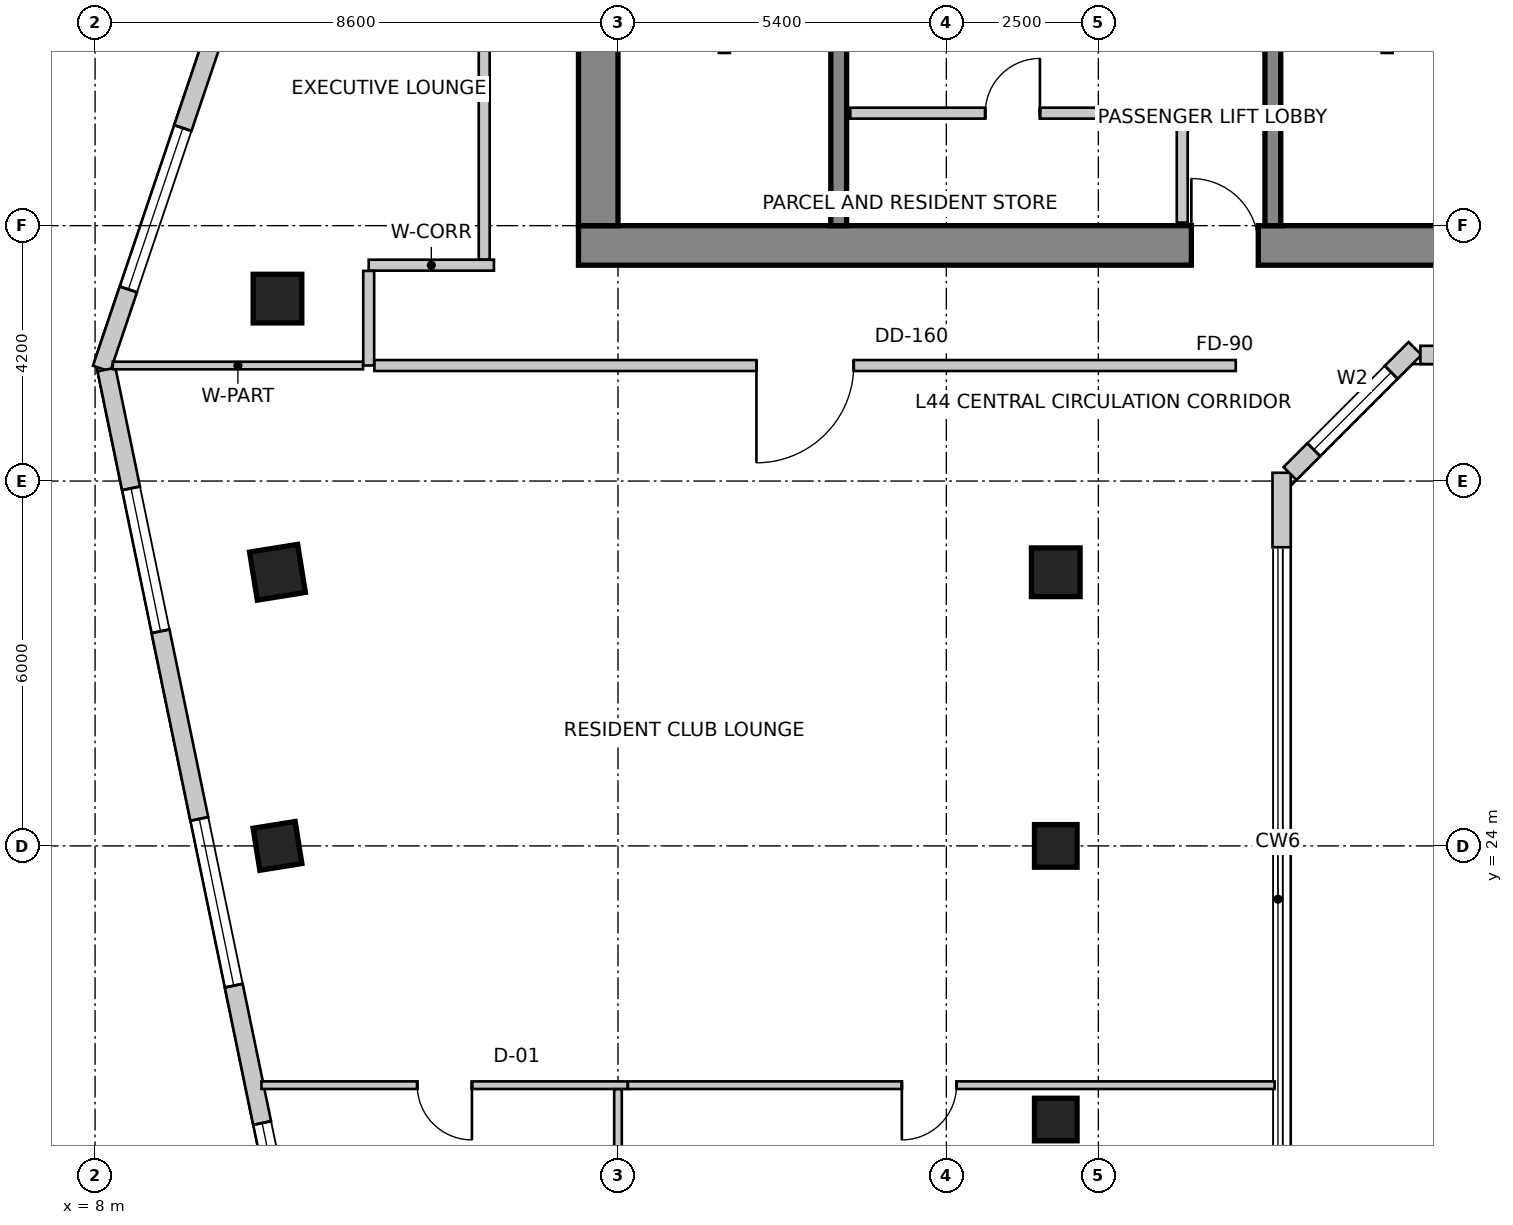
"""IFC4 building model, lengths in metres.
Left out: names, types, materials, properties, quantities, classifications, styles, units other than length and angle.
Written with IfcOpenShell. Run it as: python <this file> out.ifc"""

import sys

from ifc_helpers import new_model, si_unit, direction, frame, frame_2d, origin, origin_2d, place, context, subcontext, project, spatial, rectangle, extrude, source, transform, mapped, element, fill, save


model = new_model("IFC4")
c1 = context("Model", 3, precision=1e-05, world=origin(), true_north=direction((0.0, 1.0)))
c2 = subcontext(c1, "Body", "Model", "MODEL_VIEW")
j1 = project(units=[si_unit("LENGTHUNIT", "METRE"), si_unit("PLANEANGLEUNIT", "RADIAN")], contexts=[c1])
p1 = place(None, origin())
s1 = spatial("IfcSite", under=j1, at=p1, CompositionType="ELEMENT")
p2 = place(p1, origin())
s2 = spatial("IfcBuilding", under=s1, at=p2, CompositionType="ELEMENT")
p3 = place(p2, frame((0.0, 0.0, 178.2)))
s3 = spatial("IfcBuildingStorey", under=s2, at=p3, CompositionType="ELEMENT", Elevation=178.2)
p4 = place(p3, frame((15.95, 33.875, 0.0), z_axis=(0.0, 0.0, 1.0), x_axis=(1.0, 0.0, 0.0)))
e1 = element("IfcWall", 1, at=p4, inside=s3, PredefinedType="SHEAR", context=c2, shape_type="SweptSolid", body=[
    extrude(rectangle(XDim=15.7, YDim=0.65, at=frame_2d((7.85, 0.0))), origin(), (0.0, 0.0, 1.0), 5.2),
])
m1 = source(origin(), c2, "Body", "SweptSolid", [
    extrude(rectangle(XDim=1.1, YDim=2.15, at=frame_2d((0.55, 1.075))), frame((0.0, 0.335, 0.0), z_axis=(0.0, -1.0, 0.0), x_axis=(1.0, 0.0, 0.0)), (0.0, 0.0, 1.0), 0.67),
])
p5 = place(p4, frame((10.08, 0.0, 0.0)))
e2 = element("IfcOpeningElement", 2, at=p5, cuts=e1, PredefinedType="OPENING", context=c2, shape_type="MappedRepresentation", body=[
    mapped(m1, transform((0.0, 0.0, 0.0), scale=1.0)),
])
p6 = place(p3, frame((16.275, 34.2, 0.0), z_axis=(0.0, 0.0, 1.0), x_axis=(0.0, 1.0, 0.0)))
e3 = element("IfcWall", 3, at=p6, inside=s3, PredefinedType="SHEAR", context=c2, shape_type="SweptSolid", body=[
    extrude(rectangle(XDim=11.4, YDim=0.65, at=frame_2d((5.7, 0.0))), origin(), (0.0, 0.0, 1.0), 5.2),
])
p7 = place(p6, frame((7.15, 0.0, 0.0)))
e4 = element("IfcOpeningElement", 4, at=p7, cuts=e3, PredefinedType="OPENING", context=c2, shape_type="MappedRepresentation", body=[
    mapped(m1, transform((0.0, 0.0, 0.0), scale=1.0)),
])
p8 = place(p3, frame((20.23, 34.2, 0.0), z_axis=(0.0, 0.0, 1.0), x_axis=(0.0, 1.0, 0.0)))
e5 = element("IfcWall", 5, at=p8, inside=s3, PredefinedType="SHEAR", context=c2, shape_type="SweptSolid", body=[
    extrude(rectangle(XDim=9.06, YDim=0.26, at=frame_2d((4.53, 0.0))), origin(), (0.0, 0.0, 1.0), 5.2),
])
m2 = source(origin(), c2, "Body", "SweptSolid", [
    extrude(rectangle(XDim=1.1, YDim=2.15, at=frame_2d((0.55, 1.075))), frame((0.0, 0.14, 0.0), z_axis=(0.0, -1.0, 0.0), x_axis=(1.0, 0.0, 0.0)), (0.0, 0.0, 1.0), 0.28),
])
p9 = place(p8, frame((7.45, 0.0, 0.0)))
e6 = element("IfcOpeningElement", 6, at=p9, cuts=e5, PredefinedType="OPENING", context=c2, shape_type="MappedRepresentation", body=[
    mapped(m2, transform((0.0, 0.0, 0.0), scale=1.0)),
])
p10 = place(p3, frame((27.37, 34.2, 0.0), z_axis=(0.0, 0.0, 1.0), x_axis=(0.0, 1.0, 0.0)))
e7 = element("IfcWall", 7, at=p10, inside=s3, PredefinedType="SHEAR", context=c2, shape_type="SweptSolid", body=[
    extrude(rectangle(XDim=9.06, YDim=0.26, at=frame_2d((4.53, 0.0))), origin(), (0.0, 0.0, 1.0), 5.2),
])
p11 = place(p10, frame((7.45, 0.0, 0.0)))
e8 = element("IfcOpeningElement", 8, at=p11, cuts=e7, PredefinedType="OPENING", context=c2, shape_type="MappedRepresentation", body=[
    mapped(m2, transform((0.0, 0.0, 0.0), scale=1.0)),
])
m3 = source(origin(), c2, "Body", "SweptSolid", [
    extrude(rectangle(XDim=0.8, YDim=0.8, at=origin_2d()), origin(), (0.0, 0.0, 1.0), 5.2),
])
for number, where, z_axis, x_axis in (
    (9, (11.0, 33.0, 0.0), (0.0, 0.0, 1.0), (1.0, 0.0, 0.0)),
    (10, (11.0, 28.5, 0.0), (0.0, 0.0, 1.0), (0.158, -0.987, 0.0)),
):
    element("IfcColumn", number, at=place(p3, frame(where, z_axis=z_axis, x_axis=x_axis)), inside=s3, PredefinedType="COLUMN", context=c2, shape_type="MappedRepresentation", body=[
        mapped(m3, transform((0.0, 0.0, 0.0), scale=1.0)),
    ])
m4 = source(origin(), c2, "Body", "SweptSolid", [
    extrude(rectangle(XDim=0.7, YDim=0.7, at=origin_2d()), origin(), (0.0, 0.0, 1.0), 5.2),
])
p12 = place(p3, frame((11.0, 24.0, 0.0), z_axis=(0.0, 0.0, 1.0), x_axis=(0.158158067254, -0.987413806751, 0.0)))
e11 = element("IfcColumn", 11, at=p12, inside=s3, PredefinedType="COLUMN", context=c2, shape_type="MappedRepresentation", body=[
    mapped(m4, transform((0.0, 0.0, 0.0), scale=1.0)),
])
p13 = place(p3, frame((23.8, 28.5, 0.0), z_axis=(0.0, 0.0, 1.0), x_axis=(1.0, 0.0, 0.0)))
e12 = element("IfcColumn", 12, at=p13, inside=s3, PredefinedType="COLUMN", context=c2, shape_type="MappedRepresentation", body=[
    mapped(m3, transform((0.0, 0.0, 0.0), scale=1.0)),
])
for number, where, z_axis, x_axis in (
    (13, (23.8, 24.0, 0.0), (0.0, 0.0, 1.0), (1.0, 0.0, 0.0)),
    (14, (23.8, 19.5, 0.0), (0.0, 0.0, 1.0), (1.0, 0.0, 0.0)),
):
    element("IfcColumn", number, at=place(p3, frame(where, z_axis=z_axis, x_axis=x_axis)), inside=s3, PredefinedType="COLUMN", context=c2, shape_type="MappedRepresentation", body=[
        mapped(m4, transform((0.0, 0.0, 0.0), scale=1.0)),
    ])
p14 = place(p3, frame((27.514, 28.911, 0.0), z_axis=(0.0, 0.0, 1.0), x_axis=(0.0, 1.0, 0.0)))
e15 = element("IfcWall", 15, at=p14, inside=s3, PredefinedType="SOLIDWALL", context=c2, shape_type="SweptSolid", body=[
    extrude(rectangle(XDim=1.225, YDim=0.3, at=frame_2d((0.612, 0.0))), origin(), (0.0, 0.0, 1.0), 4.95),
])
p15 = place(p3, frame((27.652, 30.124, 0.0), z_axis=(0.0, 0.0, 1.0), x_axis=(0.707064797706, 0.707148762175, 0.0)))
e16 = element("IfcWall", 16, at=p15, inside=s3, PredefinedType="SOLIDWALL", context=c2, shape_type="SweptSolid", body=[
    extrude(rectangle(XDim=2.908, YDim=0.3, at=frame_2d((1.454, 0.0))), origin(), (0.0, 0.0, 1.0), 4.95),
])
m5 = source(origin(), c2, "Body", "SweptSolid", [
    extrude(rectangle(XDim=1.8, YDim=2.1, at=frame_2d((0.9, 1.05))), frame((0.0, 0.16, 0.0), z_axis=(0.0, -1.0, 0.0), x_axis=(1.0, 0.0, 0.0)), (0.0, 0.0, 1.0), 0.32),
])
p16 = place(p15, frame((0.554, 0.0, 0.85)))
e17 = element("IfcOpeningElement", 17, at=p16, cuts=e16, PredefinedType="OPENING", context=c2, shape_type="MappedRepresentation", body=[
    mapped(m5, transform((0.0, 0.0, 0.0), scale=1.0)),
])
p17 = place(p3, frame((29.797, 32.074, 0.0), z_axis=(0.0, 0.0, 1.0), x_axis=(1.0, 0.0, 0.0)))
e18 = element("IfcWall", 18, at=p17, inside=s3, PredefinedType="SOLIDWALL", context=c2, shape_type="SweptSolid", body=[
    extrude(rectangle(XDim=0.88, YDim=0.3, at=frame_2d((0.44, 0.0))), origin(), (0.0, 0.0, 1.0), 4.95),
])
p18 = place(p3, frame((13.269, 47.134, 0.0), z_axis=(0.0, 0.0, 1.0), x_axis=(-0.319920776449, -0.947444297464, 0.0)))
e19 = element("IfcWall", 19, at=p18, inside=s3, PredefinedType="SOLIDWALL", context=c2, shape_type="SweptSolid", body=[
    extrude(rectangle(XDim=16.133, YDim=0.3, at=frame_2d((8.067, 0.0))), origin(), (0.0, 0.0, 1.0), 4.95),
])
m6 = source(origin(), c2, "Body", "SweptSolid", [
    extrude(rectangle(XDim=2.8, YDim=2.4, at=frame_2d((1.4, 1.2))), frame((0.0, 0.16, 0.0), z_axis=(0.0, -1.0, 0.0), x_axis=(1.0, 0.0, 0.0)), (0.0, 0.0, 1.0), 0.32),
])
p19 = place(p18, frame((2.163, 0.0, 0.85)))
e20 = element("IfcOpeningElement", 20, at=p19, cuts=e19, PredefinedType="OPENING", context=c2, shape_type="MappedRepresentation", body=[
    mapped(m6, transform((0.0, 0.0, 0.0), scale=1.0)),
])
m7 = source(origin(), c2, "Body", "SweptSolid", [
    extrude(rectangle(XDim=2.4, YDim=2.2, at=frame_2d((1.2, 1.1))), frame((0.0, 0.16, 0.0), z_axis=(0.0, -1.0, 0.0), x_axis=(1.0, 0.0, 0.0)), (0.0, 0.0, 1.0), 0.32),
])
p20 = place(p18, frame((7.26, 0.0, 0.85)))
e21 = element("IfcOpeningElement", 21, at=p20, cuts=e19, PredefinedType="OPENING", context=c2, shape_type="MappedRepresentation", body=[
    mapped(m7, transform((0.0, 0.0, 0.0), scale=1.0)),
])
p21 = place(p18, frame((11.957, 0.0, 0.85)))
e22 = element("IfcOpeningElement", 22, at=p21, cuts=e19, PredefinedType="OPENING", context=c2, shape_type="MappedRepresentation", body=[
    mapped(m6, transform((0.0, 0.0, 0.0), scale=1.0)),
])
p22 = place(p3, frame((8.188, 31.834, 0.0), z_axis=(0.0, 0.0, 1.0), x_axis=(0.202303475707, -0.979322880217, 0.0)))
e23 = element("IfcWall", 23, at=p22, inside=s3, PredefinedType="SOLIDWALL", context=c2, shape_type="SweptSolid", body=[
    extrude(rectangle(XDim=15.766, YDim=0.3, at=frame_2d((7.883, 0.0))), origin(), (0.0, 0.0, 1.0), 4.95),
])
p23 = place(p22, frame((1.995, 0.0, 0.85)))
e24 = element("IfcOpeningElement", 24, at=p23, cuts=e23, PredefinedType="OPENING", context=c2, shape_type="MappedRepresentation", body=[
    mapped(m7, transform((0.0, 0.0, 0.0), scale=1.0)),
])
p24 = place(p22, frame((7.546, 0.0, 0.85)))
e25 = element("IfcOpeningElement", 25, at=p24, cuts=e23, PredefinedType="OPENING", context=c2, shape_type="MappedRepresentation", body=[
    mapped(m6, transform((0.0, 0.0, 0.0), scale=1.0)),
])
p25 = place(p22, frame((12.653, 0.0, 0.85)))
e26 = element("IfcOpeningElement", 26, at=p25, cuts=e23, PredefinedType="OPENING", context=c2, shape_type="MappedRepresentation", body=[
    mapped(m7, transform((0.0, 0.0, 0.0), scale=1.0)),
])
p26 = place(p3, frame((20.42, 36.05, 0.0), z_axis=(0.0, 0.0, 1.0), x_axis=(1.0, 0.0, 0.0)))
e27 = element("IfcWall", 27, at=p26, inside=s3, PredefinedType="PARTITIONING", context=c2, shape_type="SweptSolid", body=[
    extrude(rectangle(XDim=5.46, YDim=0.18, at=frame_2d((2.73, 0.0))), origin(), (0.0, 0.0, 1.0), 4.95),
])
m8 = source(origin(), c2, "Body", "SweptSolid", [
    extrude(rectangle(XDim=0.9, YDim=2.15, at=frame_2d((0.45, 1.075))), frame((0.0, 0.1, 0.0), z_axis=(0.0, -1.0, 0.0), x_axis=(1.0, 0.0, 0.0)), (0.0, 0.0, 1.0), 0.2),
])
p27 = place(p26, frame((2.219, 0.0, 0.0)))
e28 = element("IfcOpeningElement", 28, at=p27, cuts=e27, PredefinedType="OPENING", context=c2, shape_type="MappedRepresentation", body=[
    mapped(m8, transform((0.0, 0.0, 0.0), scale=1.0)),
])
p28 = place(p3, frame((25.88, 35.956, 0.0), z_axis=(0.0, 0.0, 1.0), x_axis=(0.0, -1.0, 0.0)))
e29 = element("IfcWall", 29, at=p28, inside=s3, PredefinedType="PARTITIONING", context=c2, shape_type="SweptSolid", body=[
    extrude(rectangle(XDim=1.706, YDim=0.18, at=frame_2d((0.853, 0.0))), origin(), (0.0, 0.0, 1.0), 4.242),
])
p29 = place(p3, frame((12.5, 33.55, 0.0), z_axis=(0.0, 0.0, 1.0), x_axis=(1.0, 0.0, 0.0)))
e30 = element("IfcWall", 30, at=p29, inside=s3, PredefinedType="PARTITIONING", context=c2, shape_type="SweptSolid", body=[
    extrude(rectangle(XDim=2.06, YDim=0.18, at=frame_2d((1.03, 0.0))), origin(), (0.0, 0.0, 1.0), 4.95),
])
p30 = place(p3, frame((12.5, 31.9, 0.0), z_axis=(0.0, 0.0, 1.0), x_axis=(0.0, 1.0, 0.0)))
e31 = element("IfcWall", 31, at=p30, inside=s3, PredefinedType="PARTITIONING", context=c2, shape_type="SweptSolid", body=[
    extrude(rectangle(XDim=1.556, YDim=0.18, at=frame_2d((0.778, 0.0))), origin(), (0.0, 0.0, 1.0), 4.634),
])
p31 = place(p3, frame((26.76, 31.9, 0.0), z_axis=(0.0, 0.0, 1.0), x_axis=(-1.0, 0.0, 0.0)))
e32 = element("IfcWall", 32, at=p31, inside=s3, PredefinedType="PARTITIONING", context=c2, shape_type="SweptSolid", body=[
    extrude(rectangle(XDim=14.166, YDim=0.18, at=frame_2d((7.083, 0.0))), origin(), (0.0, 0.0, 1.0), 4.634),
])
m9 = source(origin(), c2, "Body", "SweptSolid", [
    extrude(rectangle(XDim=1.6, YDim=2.15, at=frame_2d((0.8, 1.075))), frame((0.0, 0.1, 0.0), z_axis=(0.0, -1.0, 0.0), x_axis=(1.0, 0.0, 0.0)), (0.0, 0.0, 1.0), 0.2),
])
p32 = place(p31, frame((6.283, 0.0, 0.0)))
e33 = element("IfcOpeningElement", 33, at=p32, cuts=e32, PredefinedType="OPENING", context=c2, shape_type="MappedRepresentation", body=[
    mapped(m9, transform((0.0, 0.0, 0.0), scale=1.0)),
])
p33 = place(p3, frame((14.4, 33.644, 0.0), z_axis=(0.0, 0.0, 1.0), x_axis=(0.0, 1.0, 0.0)))
e34 = element("IfcWall", 34, at=p33, inside=s3, PredefinedType="PARTITIONING", context=c2, shape_type="SweptSolid", body=[
    extrude(rectangle(XDim=12.606, YDim=0.18, at=frame_2d((6.303, 0.0))), origin(), (0.0, 0.0, 1.0), 4.95),
])
p34 = place(p33, frame((4.399, 0.0, 0.0)))
e35 = element("IfcOpeningElement", 35, at=p34, cuts=e34, PredefinedType="OPENING", context=c2, shape_type="MappedRepresentation", body=[
    mapped(m8, transform((0.0, 0.0, 0.0), scale=1.0)),
])
p35 = place(p3, frame((12.406, 31.9, 0.0), z_axis=(0.0, 0.0, 1.0), x_axis=(-1.0, 0.0, 0.0)))
e36 = element("IfcWall", 36, at=p35, inside=s3, PredefinedType="PARTITIONING", context=c2, shape_type="SweptSolid", body=[
    extrude(rectangle(XDim=4.115, YDim=0.125, at=frame_2d((2.057, 0.0))), origin(), (0.0, 0.0, 1.0), 4.242),
])
p36 = place(p3, frame((16.76, 20.065, 0.0), z_axis=(0.0, 0.0, 1.0), x_axis=(-1.0, 0.0, 0.0)))
e37 = element("IfcWall", 37, at=p36, inside=s3, PredefinedType="PARTITIONING", context=c2, shape_type="SweptSolid", body=[
    extrude(rectangle(XDim=6.024, YDim=0.125, at=frame_2d((3.012, 0.0))), origin(), (0.0, 0.0, 1.0), 4.95),
])
m10 = source(origin(), c2, "Body", "SweptSolid", [
    extrude(rectangle(XDim=0.9, YDim=2.15, at=frame_2d((0.45, 1.075))), frame((0.0, 0.073, 0.0), z_axis=(0.0, -1.0, 0.0), x_axis=(1.0, 0.0, 0.0)), (0.0, 0.0, 1.0), 0.145),
])
p37 = place(p36, frame((2.562, 0.0, 0.0)))
e38 = element("IfcOpeningElement", 38, at=p37, cuts=e37, PredefinedType="OPENING", context=c2, shape_type="MappedRepresentation", body=[
    mapped(m10, transform((0.0, 0.0, 0.0), scale=1.0)),
])
p38 = place(p3, frame((27.399, 20.065, 0.0), z_axis=(0.0, 0.0, 1.0), x_axis=(-1.0, 0.0, 0.0)))
e39 = element("IfcWall", 39, at=p38, inside=s3, PredefinedType="PARTITIONING", context=c2, shape_type="SweptSolid", body=[
    extrude(rectangle(XDim=10.637, YDim=0.125, at=frame_2d((5.318, 0.0))), origin(), (0.0, 0.0, 1.0), 4.242),
])
p39 = place(p38, frame((5.231, 0.0, 0.0)))
e40 = element("IfcOpeningElement", 40, at=p39, cuts=e39, PredefinedType="OPENING", context=c2, shape_type="MappedRepresentation", body=[
    mapped(m10, transform((0.0, 0.0, 0.0), scale=1.0)),
])
p40 = place(p3, frame((16.6, 19.999, 0.0), z_axis=(0.0, 0.0, 1.0), x_axis=(0.0, -1.0, 0.0)))
e41 = element("IfcWall", 41, at=p40, inside=s3, PredefinedType="PARTITIONING", context=c2, shape_type="SweptSolid", body=[
    extrude(rectangle(XDim=7.134, YDim=0.125, at=frame_2d((3.567, 0.0))), origin(), (0.0, 0.0, 1.0), 4.242),
])
m11 = source(origin(), c2, "Body", "SweptSolid", [
    extrude(rectangle(XDim=1.8, YDim=2.1, at=frame_2d((0.9, 1.05))), frame((0.0, -0.015, 0.0), z_axis=(0.0, -1.0, 0.0), x_axis=(1.0, 0.0, 0.0)), (0.0, 0.0, 1.0), 0.06),
])
p41 = place(p16, origin())
e42 = element("IfcWindow", 42, at=p41, inside=s3, PartitioningType="SINGLE_PANEL", PredefinedType="WINDOW", context=c2, shape_type="MappedRepresentation", body=[
    mapped(m11, transform((0.0, 0.0, 0.0), scale=1.0)),
])
fill(e17, e42)
m12 = source(origin(), c2, "Body", "SweptSolid", [
    extrude(rectangle(XDim=2.8, YDim=2.4, at=frame_2d((1.4, 1.2))), frame((0.0, -0.015, 0.0), z_axis=(0.0, -1.0, 0.0), x_axis=(1.0, 0.0, 0.0)), (0.0, 0.0, 1.0), 0.06),
])
p42 = place(p21, origin())
e43 = element("IfcWindow", 43, at=p42, inside=s3, PartitioningType="SINGLE_PANEL", PredefinedType="WINDOW", context=c2, shape_type="MappedRepresentation", body=[
    mapped(m12, transform((0.0, 0.0, 0.0), scale=1.0)),
])
fill(e22, e43)
m13 = source(origin(), c2, "Body", "SweptSolid", [
    extrude(rectangle(XDim=2.4, YDim=2.2, at=frame_2d((1.2, 1.1))), frame((0.0, -0.015, 0.0), z_axis=(0.0, -1.0, 0.0), x_axis=(1.0, 0.0, 0.0)), (0.0, 0.0, 1.0), 0.06),
])
p43 = place(p23, origin())
e44 = element("IfcWindow", 44, at=p43, inside=s3, PartitioningType="SINGLE_PANEL", PredefinedType="WINDOW", context=c2, shape_type="MappedRepresentation", body=[
    mapped(m13, transform((0.0, 0.0, 0.0), scale=1.0)),
])
fill(e24, e44)
p44 = place(p24, origin())
e45 = element("IfcWindow", 45, at=p44, inside=s3, PartitioningType="SINGLE_PANEL", PredefinedType="WINDOW", context=c2, shape_type="MappedRepresentation", body=[
    mapped(m12, transform((0.0, 0.0, 0.0), scale=1.0)),
])
fill(e25, e45)
p45 = place(p25, origin())
e46 = element("IfcWindow", 46, at=p45, inside=s3, PartitioningType="SINGLE_PANEL", PredefinedType="WINDOW", context=c2, shape_type="MappedRepresentation", body=[
    mapped(m13, transform((0.0, 0.0, 0.0), scale=1.0)),
])
fill(e26, e46)
m14 = source(origin(), c2, "Body", "SweptSolid", [
    extrude(rectangle(XDim=1.1, YDim=2.15, at=frame_2d((0.55, 1.075))), frame((0.0, 0.025, 0.0), z_axis=(0.0, -1.0, 0.0), x_axis=(1.0, 0.0, 0.0)), (0.0, 0.0, 1.0), 0.05),
])
p46 = place(p5, origin())
e47 = element("IfcDoor", 47, at=p46, inside=s3, OperationType="SINGLE_SWING_LEFT", PredefinedType="DOOR", context=c2, shape_type="MappedRepresentation", body=[
    mapped(m14, transform((0.0, 0.0, 0.0), scale=1.0)),
])
fill(e2, e47)
m15 = source(origin(), c2, "Body", "SweptSolid", [
    extrude(rectangle(XDim=0.9, YDim=2.15, at=frame_2d((0.45, 1.075))), frame((0.0, 0.025, 0.0), z_axis=(0.0, -1.0, 0.0), x_axis=(1.0, 0.0, 0.0)), (0.0, 0.0, 1.0), 0.05),
])
p47 = place(p27, origin())
e48 = element("IfcDoor", 48, at=p47, inside=s3, OperationType="SINGLE_SWING_RIGHT", PredefinedType="DOOR", context=c2, shape_type="MappedRepresentation", body=[
    mapped(m15, transform((0.0, 0.0, 0.0), scale=1.0)),
])
fill(e28, e48)
m16 = source(origin(), c2, "Body", "SweptSolid", [
    extrude(rectangle(XDim=1.6, YDim=2.15, at=frame_2d((0.8, 1.075))), frame((0.0, 0.025, 0.0), z_axis=(0.0, -1.0, 0.0), x_axis=(1.0, 0.0, 0.0)), (0.0, 0.0, 1.0), 0.05),
])
p48 = place(p32, origin())
e49 = element("IfcDoor", 49, at=p48, inside=s3, OperationType="SINGLE_SWING_RIGHT", PredefinedType="DOOR", context=c2, shape_type="MappedRepresentation", body=[
    mapped(m16, transform((0.0, 0.0, 0.0), scale=1.0)),
])
fill(e33, e49)
m17 = source(origin(), c2, "Body", "SweptSolid", [
    extrude(rectangle(XDim=0.9, YDim=2.15, at=frame_2d((0.45, 1.075))), frame((0.0, 0.025, 0.0), z_axis=(0.0, -1.0, 0.0), x_axis=(1.0, 0.0, 0.0)), (0.0, 0.0, 1.0), 0.05),
])
p49 = place(p37, origin())
e50 = element("IfcDoor", 50, at=p49, inside=s3, OperationType="SINGLE_SWING_LEFT", PredefinedType="DOOR", context=c2, shape_type="MappedRepresentation", body=[
    mapped(m17, transform((0.0, 0.0, 0.0), scale=1.0)),
])
fill(e38, e50)
p50 = place(p39, origin())
e51 = element("IfcDoor", 51, at=p50, inside=s3, OperationType="SINGLE_SWING_RIGHT", PredefinedType="DOOR", context=c2, shape_type="MappedRepresentation", body=[
    mapped(m17, transform((0.0, 0.0, 0.0), scale=1.0)),
])
fill(e40, e51)
save(model, sys.argv[1])
